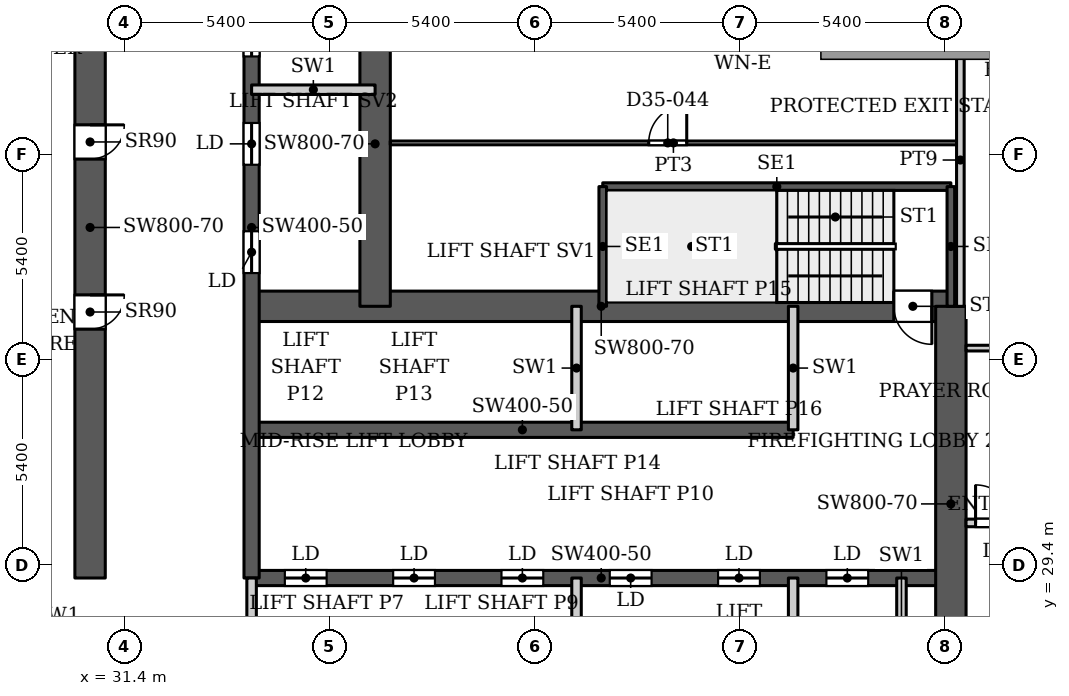
"""IFC4 building model, lengths in metres.
Left out: names, types, materials, properties, quantities, classifications, styles, units other than length and angle.
Written with IfcOpenShell. Run it as: python <this file> out.ifc"""

import sys

from ifc_helpers import new_model, si_unit, direction, frame, frame_2d, origin, place, context, subcontext, project, spatial, rectangle, extrude, source, transform, mapped, element, fill, save


model = new_model("IFC4")
c1 = context("Model", 3, precision=1e-05, world=origin(), true_north=direction((0.0, 1.0)))
c2 = subcontext(c1, "Body", "Model", "MODEL_VIEW")
j1 = project(units=[si_unit("LENGTHUNIT", "METRE"), si_unit("PLANEANGLEUNIT", "RADIAN")], contexts=[c1])
p1 = place(None, origin())
s1 = spatial("IfcSite", under=j1, at=p1, CompositionType="ELEMENT")
p2 = place(p1, origin())
s2 = spatial("IfcBuilding", under=s1, at=p2, CompositionType="ELEMENT")
p3 = place(p2, frame((0.0, 0.0, 156.5)))
s3 = spatial("IfcBuildingStorey", under=s2, at=p3, CompositionType="ELEMENT", Elevation=156.5)
p4 = place(p3, frame((34.75, 29.05, 0.0), z_axis=(0.0, 0.0, 1.0), x_axis=(1.0, 0.0, 0.0)))
e1 = element("IfcWall", 1, at=p4, inside=s3, PredefinedType="SHEAR", context=c2, shape_type="SweptSolid", body=[
    extrude(rectangle(XDim=18.4, YDim=0.4, at=frame_2d((9.2, 0.0))), origin(), (0.0, 0.0, 1.0), 3.9),
])
p5 = place(p4, frame((0.875, 0.0, 0.0)))
e2 = element("IfcOpeningElement", 2, at=p5, cuts=e1, PredefinedType="OPENING", context=c2, shape_type="SweptSolid", body=[
    extrude(rectangle(XDim=1.1, YDim=2.2, at=frame_2d((0.55, 1.1))), frame((0.0, 0.21, 0.0), z_axis=(0.0, -1.0, 0.0), x_axis=(1.0, 0.0, 0.0)), (0.0, 0.0, 1.0), 0.42),
])
p6 = place(p4, frame((3.725, 0.0, 0.0)))
e3 = element("IfcOpeningElement", 3, at=p6, cuts=e1, PredefinedType="OPENING", context=c2, shape_type="SweptSolid", body=[
    extrude(rectangle(XDim=1.1, YDim=2.2, at=frame_2d((0.55, 1.1))), frame((0.0, 0.21, 0.0), z_axis=(0.0, -1.0, 0.0), x_axis=(1.0, 0.0, 0.0)), (0.0, 0.0, 1.0), 0.42),
])
p7 = place(p4, frame((6.575, 0.0, 0.0)))
e4 = element("IfcOpeningElement", 4, at=p7, cuts=e1, PredefinedType="OPENING", context=c2, shape_type="SweptSolid", body=[
    extrude(rectangle(XDim=1.1, YDim=2.2, at=frame_2d((0.55, 1.1))), frame((0.0, 0.21, 0.0), z_axis=(0.0, -1.0, 0.0), x_axis=(1.0, 0.0, 0.0)), (0.0, 0.0, 1.0), 0.42),
])
p8 = place(p4, frame((9.425, 0.0, 0.0)))
e5 = element("IfcOpeningElement", 5, at=p8, cuts=e1, PredefinedType="OPENING", context=c2, shape_type="SweptSolid", body=[
    extrude(rectangle(XDim=1.1, YDim=2.2, at=frame_2d((0.55, 1.1))), frame((0.0, 0.21, 0.0), z_axis=(0.0, -1.0, 0.0), x_axis=(1.0, 0.0, 0.0)), (0.0, 0.0, 1.0), 0.42),
])
p9 = place(p4, frame((12.275, 0.0, 0.0)))
e6 = element("IfcOpeningElement", 6, at=p9, cuts=e1, PredefinedType="OPENING", context=c2, shape_type="SweptSolid", body=[
    extrude(rectangle(XDim=1.1, YDim=2.2, at=frame_2d((0.55, 1.1))), frame((0.0, 0.21, 0.0), z_axis=(0.0, -1.0, 0.0), x_axis=(1.0, 0.0, 0.0)), (0.0, 0.0, 1.0), 0.42),
])
p10 = place(p4, frame((15.125, 0.0, 0.0)))
e7 = element("IfcOpeningElement", 7, at=p10, cuts=e1, PredefinedType="OPENING", context=c2, shape_type="SweptSolid", body=[
    extrude(rectangle(XDim=1.1, YDim=2.2, at=frame_2d((0.55, 1.1))), frame((0.0, 0.21, 0.0), z_axis=(0.0, -1.0, 0.0), x_axis=(1.0, 0.0, 0.0)), (0.0, 0.0, 1.0), 0.42),
])
p11 = place(p3, frame((34.75, 32.95, 0.0), z_axis=(0.0, 0.0, 1.0), x_axis=(1.0, 0.0, 0.0)))
e8 = element("IfcWall", 8, at=p11, inside=s3, PredefinedType="SHEAR", context=c2, shape_type="SweptSolid", body=[
    extrude(rectangle(XDim=14.25, YDim=0.4, at=frame_2d((7.125, 0.0))), origin(), (0.0, 0.0, 1.0), 3.9),
])
p12 = place(p3, frame((34.75, 36.2, 0.0), z_axis=(0.0, 0.0, 1.0), x_axis=(1.0, 0.0, 0.0)))
e9 = element("IfcWall", 9, at=p12, inside=s3, PredefinedType="SHEAR", context=c2, shape_type="SweptSolid", body=[
    extrude(rectangle(XDim=18.4, YDim=0.8, at=frame_2d((9.2, 0.0))), origin(), (0.0, 0.0, 1.0), 3.9),
])
p13 = place(p12, frame((16.9, 0.0, 0.0)))
e10 = element("IfcOpeningElement", 10, at=p13, cuts=e9, PredefinedType="OPENING", context=c2, shape_type="SweptSolid", body=[
    extrude(rectangle(XDim=1.0, YDim=2.2, at=frame_2d((0.5, 1.1))), frame((0.0, 0.41, 0.0), z_axis=(0.0, -1.0, 0.0), x_axis=(1.0, 0.0, 0.0)), (0.0, 0.0, 1.0), 0.82),
])
p14 = place(p3, frame((34.75, 29.05, 0.0), z_axis=(0.0, 0.0, 1.0), x_axis=(0.0, 1.0, 0.0)))
e11 = element("IfcWall", 11, at=p14, inside=s3, PredefinedType="SHEAR", context=c2, shape_type="SweptSolid", body=[
    extrude(rectangle(XDim=18.45, YDim=0.4, at=frame_2d((9.225, 0.0))), origin(), (0.0, 0.0, 1.0), 3.9),
])
p15 = place(p14, frame((8.025, 0.0, 0.0)))
e12 = element("IfcOpeningElement", 12, at=p15, cuts=e11, PredefinedType="OPENING", context=c2, shape_type="SweptSolid", body=[
    extrude(rectangle(XDim=1.1, YDim=2.2, at=frame_2d((0.55, 1.1))), frame((0.0, 0.21, 0.0), z_axis=(0.0, -1.0, 0.0), x_axis=(1.0, 0.0, 0.0)), (0.0, 0.0, 1.0), 0.42),
])
p16 = place(p14, frame((10.875, 0.0, 0.0)))
e13 = element("IfcOpeningElement", 13, at=p16, cuts=e11, PredefinedType="OPENING", context=c2, shape_type="SweptSolid", body=[
    extrude(rectangle(XDim=1.1, YDim=2.2, at=frame_2d((0.55, 1.1))), frame((0.0, 0.21, 0.0), z_axis=(0.0, -1.0, 0.0), x_axis=(1.0, 0.0, 0.0)), (0.0, 0.0, 1.0), 0.42),
])
p17 = place(p14, frame((13.725, 0.0, 0.0)))
e14 = element("IfcOpeningElement", 14, at=p17, cuts=e11, PredefinedType="OPENING", context=c2, shape_type="SweptSolid", body=[
    extrude(rectangle(XDim=1.1, YDim=2.2, at=frame_2d((0.55, 1.1))), frame((0.0, 0.21, 0.0), z_axis=(0.0, -1.0, 0.0), x_axis=(1.0, 0.0, 0.0)), (0.0, 0.0, 1.0), 0.42),
])
p18 = place(p14, frame((15.95, 0.0, 0.0)))
e15 = element("IfcOpeningElement", 15, at=p18, cuts=e11, PredefinedType="OPENING", context=c2, shape_type="SweptSolid", body=[
    extrude(rectangle(XDim=1.1, YDim=2.2, at=frame_2d((0.55, 1.1))), frame((0.0, 0.21, 0.0), z_axis=(0.0, -1.0, 0.0), x_axis=(1.0, 0.0, 0.0)), (0.0, 0.0, 1.0), 0.42),
])
p19 = place(p3, frame((38.0, 36.2, 0.0), z_axis=(0.0, 0.0, 1.0), x_axis=(0.0, 1.0, 0.0)))
e16 = element("IfcWall", 16, at=p19, inside=s3, PredefinedType="SHEAR", context=c2, shape_type="SweptSolid", body=[
    extrude(rectangle(XDim=8.55, YDim=0.8, at=frame_2d((4.275, 0.0))), origin(), (0.0, 0.0, 1.0), 3.9),
])
p20 = place(p3, frame((30.5, 29.05, 0.0), z_axis=(0.0, 0.0, 1.0), x_axis=(0.0, 1.0, 0.0)))
e17 = element("IfcWall", 17, at=p20, inside=s3, PredefinedType="SHEAR", context=c2, shape_type="SweptSolid", body=[
    extrude(rectangle(XDim=18.45, YDim=0.8, at=frame_2d((9.225, 0.0))), origin(), (0.0, 0.0, 1.0), 3.9),
])
p21 = place(p20, frame((6.55, 0.0, 0.0)))
e18 = element("IfcOpeningElement", 18, at=p21, cuts=e17, PredefinedType="OPENING", context=c2, shape_type="SweptSolid", body=[
    extrude(rectangle(XDim=0.9, YDim=2.2, at=frame_2d((0.45, 1.1))), frame((0.0, 0.41, 0.0), z_axis=(0.0, -1.0, 0.0), x_axis=(1.0, 0.0, 0.0)), (0.0, 0.0, 1.0), 0.82),
])
p22 = place(p20, frame((11.025, 0.0, 0.0)))
e19 = element("IfcOpeningElement", 19, at=p22, cuts=e17, PredefinedType="OPENING", context=c2, shape_type="SweptSolid", body=[
    extrude(rectangle(XDim=0.9, YDim=2.2, at=frame_2d((0.45, 1.1))), frame((0.0, 0.41, 0.0), z_axis=(0.0, -1.0, 0.0), x_axis=(1.0, 0.0, 0.0)), (0.0, 0.0, 1.0), 0.82),
])
p23 = place(p3, frame((53.15, 25.8, 0.0), z_axis=(0.0, 0.0, 1.0), x_axis=(0.0, 1.0, 0.0)))
e20 = element("IfcWall", 20, at=p23, inside=s3, PredefinedType="SHEAR", context=c2, shape_type="SweptSolid", body=[
    extrude(rectangle(XDim=10.4, YDim=0.8, at=frame_2d((5.2, 0.0))), origin(), (0.0, 0.0, 1.0), 3.9),
])
p24 = place(p3, frame((29.712, 26.072, 0.0), z_axis=(0.0, 0.0, 1.0), x_axis=(-0.511028049012, 0.859564036662, 0.0)))
e21 = element("IfcWall", 21, at=p24, inside=s3, PredefinedType="SOLIDWALL", context=c2, shape_type="SweptSolid", body=[
    extrude(rectangle(XDim=4.634, YDim=0.25, at=frame_2d((2.317, 0.0))), origin(), (0.0, 0.0, 1.0), 3.147),
])
p25 = place(p3, frame((27.195, 31.969, 0.0), z_axis=(0.0, 0.0, 1.0), x_axis=(0.052554995867, 0.998618031286, 0.0)))
e22 = element("IfcWall", 22, at=p25, inside=s3, PredefinedType="SOLIDWALL", context=c2, shape_type="SweptSolid", body=[
    extrude(rectangle(XDim=66.787, YDim=0.25, at=frame_2d((33.394, 0.0))), origin(), (0.0, 0.0, 1.0), 3.75),
])
p26 = place(p3, frame((43.99, 39.35, 0.0), z_axis=(0.0, 0.0, 1.0), x_axis=(1.0, 0.0, 0.0)))
e23 = element("IfcWall", 23, at=p26, inside=s3, PredefinedType="SHEAR", context=c2, shape_type="SweptSolid", body=[
    extrude(rectangle(XDim=9.16, YDim=0.2, at=frame_2d((4.58, 0.0))), origin(), (0.0, 0.0, 1.0), 3.9),
])
for number, where, z_axis, x_axis in (
    (24, (43.99, 36.2, 0.0), (0.0, 0.0, 1.0), (0.0, 1.0, 0.0)),
    (25, (53.15, 36.2, 0.0), (0.0, 0.0, 1.0), (0.0, 1.0, 0.0)),
):
    element("IfcWall", number, at=place(p3, frame(where, z_axis=z_axis, x_axis=x_axis)), inside=s3, PredefinedType="SHEAR", context=c2, shape_type="SweptSolid", body=[
        extrude(rectangle(XDim=3.15, YDim=0.2, at=frame_2d((1.575, 0.0))), origin(), (0.0, 0.0, 1.0), 3.9),
    ])
for number, where, z_axis, x_axis in (
    (26, (34.75, 25.8, 0.0), (0.0, 0.0, 1.0), (0.0, 1.0, 0.0)),
    (27, (43.3, 25.8, 0.0), (0.0, 0.0, 1.0), (0.0, 1.0, 0.0)),
    (28, (43.3, 32.95, 0.0), (0.0, 0.0, 1.0), (0.0, 1.0, 0.0)),
    (29, (49.0, 25.8, 0.0), (0.0, 0.0, 1.0), (0.0, 1.0, 0.0)),
    (30, (49.0, 32.95, 0.0), (0.0, 0.0, 1.0), (0.0, 1.0, 0.0)),
    (31, (51.85, 25.8, 0.0), (0.0, 0.0, 1.0), (0.0, 1.0, 0.0)),
    (32, (34.75, 41.9, 0.0), (0.0, 0.0, 1.0), (1.0, 0.0, 0.0)),
):
    element("IfcWall", number, at=place(p3, frame(where, z_axis=z_axis, x_axis=x_axis)), inside=s3, PredefinedType="PARTITIONING", context=c2, shape_type="SweptSolid", body=[
        extrude(rectangle(XDim=3.25, YDim=0.25, at=frame_2d((1.625, 0.0))), origin(), (0.0, 0.0, 1.0), 3.9),
    ])
p27 = place(p3, frame((38.399, 40.5, 0.0), z_axis=(0.0, 0.0, 1.0), x_axis=(1.0, 0.0, 0.0)))
e33 = element("IfcWall", 33, at=p27, inside=s3, PredefinedType="PARTITIONING", context=c2, shape_type="SweptSolid", body=[
    extrude(rectangle(XDim=14.901, YDim=0.1, at=frame_2d((7.451, 0.0))), origin(), (0.0, 0.0, 1.0), 3.6),
])
p28 = place(p27, frame((6.801, 0.0, 0.0)))
e34 = element("IfcOpeningElement", 34, at=p28, cuts=e33, PredefinedType="OPENING", context=c2, shape_type="SweptSolid", body=[
    extrude(rectangle(XDim=1.0, YDim=2.1, at=frame_2d((0.5, 1.05))), frame((0.0, 0.06, 0.0), z_axis=(0.0, -1.0, 0.0), x_axis=(1.0, 0.0, 0.0)), (0.0, 0.0, 1.0), 0.12),
])
p29 = place(p3, frame((53.4, 36.199, 0.0), z_axis=(0.0, 0.0, 1.0), x_axis=(0.0, 1.0, 0.0)))
e35 = element("IfcWall", 35, at=p29, inside=s3, PredefinedType="PARTITIONING", context=c2, shape_type="SweptSolid", body=[
    extrude(rectangle(XDim=7.701, YDim=0.2, at=frame_2d((3.851, 0.0))), origin(), (0.0, 0.0, 1.0), 3.6),
])
p30 = place(p3, frame((53.549, 30.5, 0.0), z_axis=(0.0, 0.0, 1.0), x_axis=(1.0, 0.0, 0.0)))
e36 = element("IfcWall", 36, at=p30, inside=s3, PredefinedType="PARTITIONING", context=c2, shape_type="SweptSolid", body=[
    extrude(rectangle(XDim=35.551, YDim=0.2, at=frame_2d((17.775, 0.0))), origin(), (0.0, 0.0, 1.0), 3.6),
])
p31 = place(p30, frame((0.251, 0.0, 0.0)))
e37 = element("IfcOpeningElement", 37, at=p31, cuts=e36, PredefinedType="OPENING", context=c2, shape_type="SweptSolid", body=[
    extrude(rectangle(XDim=1.0, YDim=2.1, at=frame_2d((0.5, 1.05))), frame((0.0, 0.11, 0.0), z_axis=(0.0, -1.0, 0.0), x_axis=(1.0, 0.0, 0.0)), (0.0, 0.0, 1.0), 0.22),
])
p32 = place(p30, frame((21.701, 0.0, 0.0)))
e38 = element("IfcOpeningElement", 38, at=p32, cuts=e36, PredefinedType="OPENING", context=c2, shape_type="SweptSolid", body=[
    extrude(rectangle(XDim=1.0, YDim=2.1, at=frame_2d((0.5, 1.05))), frame((0.0, 0.11, 0.0), z_axis=(0.0, -1.0, 0.0), x_axis=(1.0, 0.0, 0.0)), (0.0, 0.0, 1.0), 0.22),
])
p33 = place(p30, frame((32.201, 0.0, 0.0)))
e39 = element("IfcOpeningElement", 39, at=p33, cuts=e36, PredefinedType="OPENING", context=c2, shape_type="SweptSolid", body=[
    extrude(rectangle(XDim=1.0, YDim=2.1, at=frame_2d((0.5, 1.05))), frame((0.0, 0.11, 0.0), z_axis=(0.0, -1.0, 0.0), x_axis=(1.0, 0.0, 0.0)), (0.0, 0.0, 1.0), 0.22),
])
p34 = place(p3, frame((53.549, 35.1, 0.0), z_axis=(0.0, 0.0, 1.0), x_axis=(1.0, 0.0, 0.0)))
e40 = element("IfcWall", 40, at=p34, inside=s3, PredefinedType="PARTITIONING", context=c2, shape_type="SweptSolid", body=[
    extrude(rectangle(XDim=9.051, YDim=0.15, at=frame_2d((4.525, 0.0))), origin(), (0.0, 0.0, 1.0), 3.6),
])
p35 = place(p34, frame((6.751, 0.0, 0.0)))
e41 = element("IfcOpeningElement", 41, at=p35, cuts=e40, PredefinedType="OPENING", context=c2, shape_type="SweptSolid", body=[
    extrude(rectangle(XDim=0.9, YDim=2.1, at=frame_2d((0.45, 1.05))), frame((0.0, 0.085, 0.0), z_axis=(0.0, -1.0, 0.0), x_axis=(1.0, 0.0, 0.0)), (0.0, 0.0, 1.0), 0.17),
])
p36 = place(p34, frame((2.051, 0.0, 0.0)))
e42 = element("IfcOpeningElement", 42, at=p36, cuts=e40, PredefinedType="OPENING", context=c2, shape_type="SweptSolid", body=[
    extrude(rectangle(XDim=1.0, YDim=2.1, at=frame_2d((0.5, 1.05))), frame((0.0, 0.085, 0.0), z_axis=(0.0, -1.0, 0.0), x_axis=(1.0, 0.0, 0.0)), (0.0, 0.0, 1.0), 0.17),
])
m1 = source(origin(), c2, "Body", "SweptSolid", [
    extrude(rectangle(XDim=1.1, YDim=2.2, at=frame_2d((0.55, 1.1))), frame((0.0, 0.025, 0.0), z_axis=(0.0, -1.0, 0.0), x_axis=(1.0, 0.0, 0.0)), (0.0, 0.0, 1.0), 0.05),
])
p37 = place(p5, origin())
e43 = element("IfcDoor", 43, at=p37, inside=s3, OperationType="SLIDING_TO_LEFT", PredefinedType="DOOR", context=c2, shape_type="MappedRepresentation", body=[
    mapped(m1, transform((0.0, 0.0, 0.0), x_axis=(1.0, 0.0, 0.0), y_axis=(0.0, 1.0, 0.0), z_axis=(0.0, 0.0, 1.0), scale=1.0)),
])
fill(e2, e43)
p38 = place(p6, origin())
e44 = element("IfcDoor", 44, at=p38, inside=s3, OperationType="SLIDING_TO_LEFT", PredefinedType="DOOR", context=c2, shape_type="MappedRepresentation", body=[
    mapped(m1, transform((0.0, 0.0, 0.0), x_axis=(1.0, 0.0, 0.0), y_axis=(0.0, 1.0, 0.0), z_axis=(0.0, 0.0, 1.0), scale=1.0)),
])
fill(e3, e44)
p39 = place(p7, origin())
e45 = element("IfcDoor", 45, at=p39, inside=s3, OperationType="SLIDING_TO_LEFT", PredefinedType="DOOR", context=c2, shape_type="MappedRepresentation", body=[
    mapped(m1, transform((0.0, 0.0, 0.0), x_axis=(1.0, 0.0, 0.0), y_axis=(0.0, 1.0, 0.0), z_axis=(0.0, 0.0, 1.0), scale=1.0)),
])
fill(e4, e45)
p40 = place(p8, origin())
e46 = element("IfcDoor", 46, at=p40, inside=s3, OperationType="SLIDING_TO_LEFT", PredefinedType="DOOR", context=c2, shape_type="MappedRepresentation", body=[
    mapped(m1, transform((0.0, 0.0, 0.0), x_axis=(1.0, 0.0, 0.0), y_axis=(0.0, 1.0, 0.0), z_axis=(0.0, 0.0, 1.0), scale=1.0)),
])
fill(e5, e46)
p41 = place(p9, origin())
e47 = element("IfcDoor", 47, at=p41, inside=s3, OperationType="SLIDING_TO_LEFT", PredefinedType="DOOR", context=c2, shape_type="MappedRepresentation", body=[
    mapped(m1, transform((0.0, 0.0, 0.0), x_axis=(1.0, 0.0, 0.0), y_axis=(0.0, 1.0, 0.0), z_axis=(0.0, 0.0, 1.0), scale=1.0)),
])
fill(e6, e47)
p42 = place(p15, origin())
e48 = element("IfcDoor", 48, at=p42, inside=s3, OperationType="SLIDING_TO_LEFT", PredefinedType="DOOR", context=c2, shape_type="MappedRepresentation", body=[
    mapped(m1, transform((0.0, 0.0, 0.0), x_axis=(1.0, 0.0, 0.0), y_axis=(0.0, 1.0, 0.0), z_axis=(0.0, 0.0, 1.0), scale=1.0)),
])
fill(e12, e48)
p43 = place(p16, origin())
e49 = element("IfcDoor", 49, at=p43, inside=s3, OperationType="SLIDING_TO_LEFT", PredefinedType="DOOR", context=c2, shape_type="MappedRepresentation", body=[
    mapped(m1, transform((0.0, 0.0, 0.0), x_axis=(1.0, 0.0, 0.0), y_axis=(0.0, 1.0, 0.0), z_axis=(0.0, 0.0, 1.0), scale=1.0)),
])
fill(e13, e49)
p44 = place(p17, origin())
e50 = element("IfcDoor", 50, at=p44, inside=s3, OperationType="SLIDING_TO_LEFT", PredefinedType="DOOR", context=c2, shape_type="MappedRepresentation", body=[
    mapped(m1, transform((0.0, 0.0, 0.0), x_axis=(1.0, 0.0, 0.0), y_axis=(0.0, 1.0, 0.0), z_axis=(0.0, 0.0, 1.0), scale=1.0)),
])
fill(e14, e50)
p45 = place(p10, origin())
e51 = element("IfcDoor", 51, at=p45, inside=s3, OperationType="SLIDING_TO_LEFT", PredefinedType="DOOR", context=c2, shape_type="MappedRepresentation", body=[
    mapped(m1, transform((0.0, 0.0, 0.0), x_axis=(1.0, 0.0, 0.0), y_axis=(0.0, 1.0, 0.0), z_axis=(0.0, 0.0, 1.0), scale=1.0)),
])
fill(e7, e51)
m2 = source(origin(), c2, "Body", "SweptSolid", [
    extrude(rectangle(XDim=0.9, YDim=2.2, at=frame_2d((0.45, 1.1))), frame((0.0, 0.025, 0.0), z_axis=(0.0, -1.0, 0.0), x_axis=(1.0, 0.0, 0.0)), (0.0, 0.0, 1.0), 0.05),
])
p46 = place(p21, origin())
e52 = element("IfcDoor", 52, at=p46, inside=s3, OperationType="SINGLE_SWING_RIGHT", PredefinedType="DOOR", context=c2, shape_type="MappedRepresentation", body=[
    mapped(m2, transform((0.0, 0.0, 0.0), x_axis=(1.0, 0.0, 0.0), y_axis=(0.0, 1.0, 0.0), z_axis=(0.0, 0.0, 1.0), scale=1.0)),
])
fill(e18, e52)
p47 = place(p22, origin())
e53 = element("IfcDoor", 53, at=p47, inside=s3, OperationType="SINGLE_SWING_RIGHT", PredefinedType="DOOR", context=c2, shape_type="MappedRepresentation", body=[
    mapped(m2, transform((0.0, 0.0, 0.0), x_axis=(1.0, 0.0, 0.0), y_axis=(0.0, 1.0, 0.0), z_axis=(0.0, 0.0, 1.0), scale=1.0)),
])
fill(e19, e53)
m3 = source(origin(), c2, "Body", "SweptSolid", [
    extrude(rectangle(XDim=1.0, YDim=2.2, at=frame_2d((0.5, 1.1))), frame((0.0, 0.025, 0.0), z_axis=(0.0, -1.0, 0.0), x_axis=(1.0, 0.0, 0.0)), (0.0, 0.0, 1.0), 0.05),
])
p48 = place(p13, origin())
e54 = element("IfcDoor", 54, at=p48, inside=s3, OperationType="SINGLE_SWING_RIGHT", PredefinedType="DOOR", context=c2, shape_type="MappedRepresentation", body=[
    mapped(m3, transform((0.0, 0.0, 0.0), x_axis=(1.0, 0.0, 0.0), y_axis=(0.0, 1.0, 0.0), z_axis=(0.0, 0.0, 1.0), scale=1.0)),
])
fill(e10, e54)
m4 = source(origin(), c2, "Body", "SweptSolid", [
    extrude(rectangle(XDim=1.0, YDim=2.1, at=frame_2d((0.5, 1.05))), frame((0.0, 0.025, 0.0), z_axis=(0.0, -1.0, 0.0), x_axis=(1.0, 0.0, 0.0)), (0.0, 0.0, 1.0), 0.05),
])
p49 = place(p31, origin())
e55 = element("IfcDoor", 55, at=p49, inside=s3, OperationType="SINGLE_SWING_LEFT", PredefinedType="DOOR", context=c2, shape_type="MappedRepresentation", body=[
    mapped(m4, transform((0.0, 0.0, 0.0), x_axis=(1.0, 0.0, 0.0), y_axis=(0.0, 1.0, 0.0), z_axis=(0.0, 0.0, 1.0), scale=1.0)),
])
fill(e37, e55)
m5 = source(origin(), c2, "Body", "SweptSolid", [
    extrude(rectangle(XDim=1.0, YDim=2.1, at=frame_2d((0.5, 1.05))), frame((0.0, 0.025, 0.0), z_axis=(0.0, -1.0, 0.0), x_axis=(1.0, 0.0, 0.0)), (0.0, 0.0, 1.0), 0.05),
])
p50 = place(p28, origin())
e56 = element("IfcDoor", 56, at=p50, inside=s3, OperationType="SINGLE_SWING_LEFT", PredefinedType="DOOR", context=c2, shape_type="MappedRepresentation", body=[
    mapped(m5, transform((0.0, 0.0, 0.0), x_axis=(1.0, 0.0, 0.0), y_axis=(0.0, 1.0, 0.0), z_axis=(0.0, 0.0, 1.0), scale=1.0)),
])
fill(e34, e56)
save(model, sys.argv[1])
